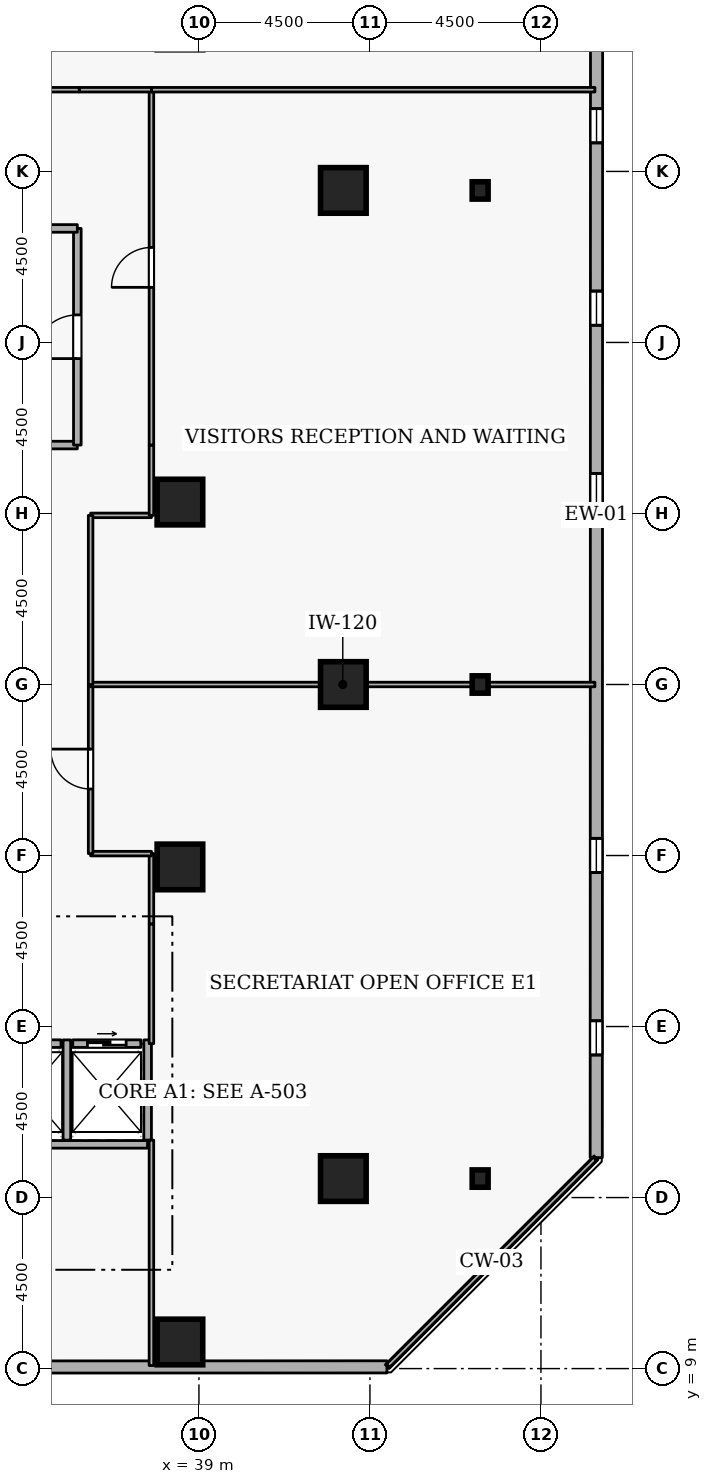
"""IFC4 building model, lengths in metres.
Left out: names, types, materials, properties, quantities, classifications, styles, units other than length and angle.
Written with IfcOpenShell. Run it as: python <this file> out.ifc"""

import sys

from ifc_helpers import new_model, si_unit, direction, frame, frame_2d, origin, origin_2d, place, context, subcontext, project, spatial, rectangle, i_section, extrude, element, fill, save


model = new_model("IFC4")
c1 = context("Model", 3, precision=1e-05, world=origin(), true_north=direction((0.0, 1.0)))
c2 = subcontext(c1, "Body", "Model", "MODEL_VIEW")
j1 = project(units=[si_unit("LENGTHUNIT", "METRE"), si_unit("PLANEANGLEUNIT", "RADIAN")], contexts=[c1])
p1 = place(None, origin())
s1 = spatial("IfcSite", under=j1, at=p1, CompositionType="ELEMENT")
p2 = place(p1, origin())
s2 = spatial("IfcBuilding", under=s1, at=p2, CompositionType="ELEMENT")
p3 = place(p2, frame((0.0, 0.0, 83.7)))
s3 = spatial("IfcBuildingStorey", under=s2, at=p3, CompositionType="ELEMENT", Elevation=83.7)
for number, where, z_axis, x_axis in (
    (1, (38.5, 9.7, 0.0), (0.0, 0.0, 1.0), (1.0, 0.0, 0.0)),
    (2, (42.8, 14.0, 0.0), (0.0, 0.0, 1.0), (1.0, 0.0, 0.0)),
    (3, (42.8, 27.0, 0.0), (0.0, 0.0, 1.0), (1.0, 0.0, 0.0)),
    (4, (42.8, 40.0, 0.0), (0.0, 0.0, 1.0), (1.0, 0.0, 0.0)),
    (5, (38.5, 22.2, 0.0), (0.0, 0.0, 1.0), (1.0, 0.0, 0.0)),
    (6, (38.5, 31.8, 0.0), (0.0, 0.0, 1.0), (1.0, 0.0, 0.0)),
):
    element("IfcColumn", number, at=place(p3, frame(where, z_axis=z_axis, x_axis=x_axis)), inside=s3, PredefinedType="COLUMN", context=c2, shape_type="SweptSolid", body=[
        extrude(rectangle(XDim=1.2, YDim=1.2, at=origin_2d()), origin(), (0.0, 0.0, 1.0), 3.6),
    ])
for number, where, z_axis, x_axis in (
    (7, (46.4, 14.0, 0.0), (0.0, 0.0, 1.0), (1.0, 0.0, 0.0)),
    (8, (46.4, 27.0, 0.0), (0.0, 0.0, 1.0), (1.0, 0.0, 0.0)),
    (9, (46.4, 40.0, 0.0), (0.0, 0.0, 1.0), (1.0, 0.0, 0.0)),
):
    element("IfcColumn", number, at=place(p3, frame(where, z_axis=z_axis, x_axis=x_axis)), inside=s3, PredefinedType="COLUMN", context=c2, shape_type="SweptSolid", body=[
        extrude(i_section(OverallWidth=0.418, OverallDepth=0.456, WebThickness=0.042, FlangeThickness=0.067, FilletRadius=0.015, at=origin_2d()), origin(), (0.0, 0.0, 1.0), 3.6),
    ])
p4 = place(p3, frame((10.119, 9.035, 0.0), z_axis=(0.0, 0.0, 1.0), x_axis=(0.999999960392, 0.000281454314, 0.0)))
e10 = element("IfcWall", 10, at=p4, inside=s3, PredefinedType="STANDARD", context=c2, shape_type="SweptSolid", body=[
    extrude(rectangle(XDim=33.83, YDim=0.32, at=frame_2d((16.915, 0.0))), origin(), (0.0, 0.0, 1.0), 2.7),
])
p5 = place(p4, frame((7.5, 0.0, 0.72)))
e11 = element("IfcOpeningElement", 11, at=p5, cuts=e10, PredefinedType="OPENING", context=c2, shape_type="SweptSolid", body=[
    extrude(rectangle(XDim=0.9, YDim=1.75, at=frame_2d((0.45, 0.875))), frame((0.0, 0.17, 0.0), z_axis=(0.0, -1.0, 0.0), x_axis=(1.0, 0.0, 0.0)), (0.0, 0.0, 1.0), 0.34),
])
p6 = place(p4, frame((12.3, 0.0, 0.72)))
e12 = element("IfcOpeningElement", 12, at=p6, cuts=e10, PredefinedType="OPENING", context=c2, shape_type="SweptSolid", body=[
    extrude(rectangle(XDim=0.9, YDim=1.75, at=frame_2d((0.45, 0.875))), frame((0.0, 0.17, 0.0), z_axis=(0.0, -1.0, 0.0), x_axis=(1.0, 0.0, 0.0)), (0.0, 0.0, 1.0), 0.34),
])
p7 = place(p4, frame((17.1, 0.0, 0.72)))
e13 = element("IfcOpeningElement", 13, at=p7, cuts=e10, PredefinedType="OPENING", context=c2, shape_type="SweptSolid", body=[
    extrude(rectangle(XDim=0.9, YDim=1.75, at=frame_2d((0.45, 0.875))), frame((0.0, 0.17, 0.0), z_axis=(0.0, -1.0, 0.0), x_axis=(1.0, 0.0, 0.0)), (0.0, 0.0, 1.0), 0.34),
])
p8 = place(p4, frame((21.9, 0.0, 0.72)))
e14 = element("IfcOpeningElement", 14, at=p8, cuts=e10, PredefinedType="OPENING", context=c2, shape_type="SweptSolid", body=[
    extrude(rectangle(XDim=0.9, YDim=1.75, at=frame_2d((0.45, 0.875))), frame((0.0, 0.17, 0.0), z_axis=(0.0, -1.0, 0.0), x_axis=(1.0, 0.0, 0.0)), (0.0, 0.0, 1.0), 0.34),
])
p9 = place(p3, frame((49.455, 14.552, 0.0), z_axis=(0.0, 0.0, 1.0), x_axis=(0.000281454314, 0.999999960392, 0.0)))
e15 = element("IfcWall", 15, at=p9, inside=s3, PredefinedType="STANDARD", context=c2, shape_type="SweptSolid", body=[
    extrude(rectangle(XDim=33.83, YDim=0.32, at=frame_2d((16.915, 0.0))), origin(), (0.0, 0.0, 1.0), 2.7),
])
p10 = place(p9, frame((2.7, 0.0, 0.72)))
e16 = element("IfcOpeningElement", 16, at=p10, cuts=e15, PredefinedType="OPENING", context=c2, shape_type="SweptSolid", body=[
    extrude(rectangle(XDim=0.9, YDim=1.75, at=frame_2d((0.45, 0.875))), frame((0.0, 0.17, 0.0), z_axis=(0.0, -1.0, 0.0), x_axis=(1.0, 0.0, 0.0)), (0.0, 0.0, 1.0), 0.34),
])
p11 = place(p9, frame((7.5, 0.0, 0.72)))
e17 = element("IfcOpeningElement", 17, at=p11, cuts=e15, PredefinedType="OPENING", context=c2, shape_type="SweptSolid", body=[
    extrude(rectangle(XDim=0.9, YDim=1.75, at=frame_2d((0.45, 0.875))), frame((0.0, 0.17, 0.0), z_axis=(0.0, -1.0, 0.0), x_axis=(1.0, 0.0, 0.0)), (0.0, 0.0, 1.0), 0.34),
])
p12 = place(p9, frame((17.1, 0.0, 0.72)))
e18 = element("IfcOpeningElement", 18, at=p12, cuts=e15, PredefinedType="OPENING", context=c2, shape_type="SweptSolid", body=[
    extrude(rectangle(XDim=0.9, YDim=1.75, at=frame_2d((0.45, 0.875))), frame((0.0, 0.17, 0.0), z_axis=(0.0, -1.0, 0.0), x_axis=(1.0, 0.0, 0.0)), (0.0, 0.0, 1.0), 0.34),
])
p13 = place(p9, frame((21.9, 0.0, 0.72)))
e19 = element("IfcOpeningElement", 19, at=p13, cuts=e15, PredefinedType="OPENING", context=c2, shape_type="SweptSolid", body=[
    extrude(rectangle(XDim=0.9, YDim=1.75, at=frame_2d((0.45, 0.875))), frame((0.0, 0.17, 0.0), z_axis=(0.0, -1.0, 0.0), x_axis=(1.0, 0.0, 0.0)), (0.0, 0.0, 1.0), 0.34),
])
p14 = place(p9, frame((26.7, 0.0, 0.72)))
e20 = element("IfcOpeningElement", 20, at=p14, cuts=e15, PredefinedType="OPENING", context=c2, shape_type="SweptSolid", body=[
    extrude(rectangle(XDim=0.9, YDim=1.75, at=frame_2d((0.45, 0.875))), frame((0.0, 0.17, 0.0), z_axis=(0.0, -1.0, 0.0), x_axis=(1.0, 0.0, 0.0)), (0.0, 0.0, 1.0), 0.34),
])
p15 = place(p3, frame((33.63, 17.55, 0.0), z_axis=(0.0, 0.0, 1.0), x_axis=(1.0, 0.0, 0.0)))
e21 = element("IfcWall", 21, at=p15, inside=s3, PredefinedType="STANDARD", context=c2, shape_type="SweptSolid", body=[
    extrude(rectangle(XDim=1.74, YDim=0.2, at=frame_2d((0.87, 0.0))), origin(), (0.0, 0.0, 1.0), 3.34),
])
p16 = place(p15, frame((0.36, 0.0, 0.0)))
e22 = element("IfcOpeningElement", 22, at=p16, cuts=e21, PredefinedType="OPENING", context=c2, shape_type="SweptSolid", body=[
    extrude(rectangle(XDim=1.02, YDim=2.06, at=frame_2d((0.51, 1.03))), frame((0.0, 0.11, 0.0), z_axis=(0.0, -1.0, 0.0), x_axis=(1.0, 0.0, 0.0)), (0.0, 0.0, 1.0), 0.22),
])
p17 = place(p3, frame((35.68, 17.55, 0.0), z_axis=(0.0, 0.0, 1.0), x_axis=(1.0, 0.0, 0.0)))
e23 = element("IfcWall", 23, at=p17, inside=s3, PredefinedType="STANDARD", context=c2, shape_type="SweptSolid", body=[
    extrude(rectangle(XDim=1.79, YDim=0.2, at=frame_2d((0.895, 0.0))), origin(), (0.0, 0.0, 1.0), 3.34),
])
p18 = place(p17, frame((0.385, 0.0, 0.0)))
e24 = element("IfcOpeningElement", 24, at=p18, cuts=e23, PredefinedType="OPENING", context=c2, shape_type="SweptSolid", body=[
    extrude(rectangle(XDim=1.02, YDim=2.06, at=frame_2d((0.51, 1.03))), frame((0.0, 0.11, 0.0), z_axis=(0.0, -1.0, 0.0), x_axis=(1.0, 0.0, 0.0)), (0.0, 0.0, 1.0), 0.22),
])
p19 = place(p3, frame((33.452, 14.9, 0.0), z_axis=(0.0, 0.0, 1.0), x_axis=(1.0, 0.0, 0.0)))
e25 = element("IfcWall", 25, at=p19, inside=s3, PredefinedType="STANDARD", context=c2, shape_type="SweptSolid", body=[
    extrude(rectangle(XDim=4.196, YDim=0.2, at=frame_2d((2.098, 0.0))), origin(), (0.0, 0.0, 1.0), 3.34),
])
for number, where, z_axis, x_axis in (
    (26, (35.525, 15.012, 0.0), (0.0, 0.0, 1.0), (0.0, 1.0, 0.0)),
    (27, (37.65, 15.012, 0.0), (0.0, 0.0, 1.0), (0.0, 1.0, 0.0)),
):
    element("IfcWall", number, at=place(p3, frame(where, z_axis=z_axis, x_axis=x_axis)), inside=s3, PredefinedType="STANDARD", context=c2, shape_type="SweptSolid", body=[
        extrude(rectangle(XDim=2.636, YDim=0.2, at=frame_2d((1.318, 0.0))), origin(), (0.0, 0.0, 1.0), 3.34),
    ])
p20 = place(p3, frame((33.3, 33.3, 0.0), z_axis=(0.0, 0.0, 1.0), x_axis=(1.0, 0.0, 0.0)))
e28 = element("IfcWall", 28, at=p20, inside=s3, PredefinedType="STANDARD", context=c2, shape_type="SweptSolid", body=[
    extrude(rectangle(XDim=2.5, YDim=0.2, at=frame_2d((1.25, 0.0))), origin(), (0.0, 0.0, 1.0), 3.34),
])
p21 = place(p3, frame((35.8, 33.3, 0.0), z_axis=(0.0, 0.0, 1.0), x_axis=(0.0, 1.0, 0.0)))
e29 = element("IfcWall", 29, at=p21, inside=s3, PredefinedType="STANDARD", context=c2, shape_type="SweptSolid", body=[
    extrude(rectangle(XDim=5.7, YDim=0.2, at=frame_2d((2.85, 0.0))), origin(), (0.0, 0.0, 1.0), 3.34),
])
p22 = place(p21, frame((2.275, 0.0, 0.0)))
e30 = element("IfcOpeningElement", 30, at=p22, cuts=e29, PredefinedType="OPENING", context=c2, shape_type="SweptSolid", body=[
    extrude(rectangle(XDim=1.15, YDim=2.1, at=frame_2d((0.575, 1.05))), frame((0.0, 0.11, 0.0), z_axis=(0.0, -1.0, 0.0), x_axis=(1.0, 0.0, 0.0)), (0.0, 0.0, 1.0), 0.22),
])
p23 = place(p3, frame((35.8, 39.0, 0.0), z_axis=(0.0, 0.0, 1.0), x_axis=(-1.0, 0.0, 0.0)))
e31 = element("IfcWall", 31, at=p23, inside=s3, PredefinedType="STANDARD", context=c2, shape_type="SweptSolid", body=[
    extrude(rectangle(XDim=2.5, YDim=0.2, at=frame_2d((1.25, 0.0))), origin(), (0.0, 0.0, 1.0), 3.34),
])
p24 = place(p3, frame((37.75, 17.55, 0.0), z_axis=(0.0, 0.0, 1.0), x_axis=(0.0, 1.0, 0.0)))
e32 = element("IfcWall", 32, at=p24, inside=s3, PredefinedType="PARTITIONING", context=c2, shape_type="SweptSolid", body=[
    extrude(rectangle(XDim=3.15, YDim=0.12, at=frame_2d((1.575, 0.0))), origin(), (0.0, 0.0, 1.0), 3.34),
])
p25 = place(p3, frame((37.75, 20.7, 0.0), z_axis=(0.0, 0.0, 1.0), x_axis=(0.0, 1.0, 0.0)))
e33 = element("IfcWall", 33, at=p25, inside=s3, PredefinedType="PARTITIONING", context=c2, shape_type="SweptSolid", body=[
    extrude(rectangle(XDim=1.85, YDim=0.12, at=frame_2d((0.925, 0.0))), origin(), (0.0, 0.0, 1.0), 3.34),
])
p26 = place(p3, frame((37.75, 22.55, 0.0), z_axis=(0.0, 0.0, 1.0), x_axis=(-1.0, 0.0, 0.0)))
e34 = element("IfcWall", 34, at=p26, inside=s3, PredefinedType="PARTITIONING", context=c2, shape_type="SweptSolid", body=[
    extrude(rectangle(XDim=1.6, YDim=0.12, at=frame_2d((0.8, 0.0))), origin(), (0.0, 0.0, 1.0), 3.34),
])
p27 = place(p3, frame((36.15, 22.55, 0.0), z_axis=(0.0, 0.0, 1.0), x_axis=(0.0, 1.0, 0.0)))
e35 = element("IfcWall", 35, at=p27, inside=s3, PredefinedType="PARTITIONING", context=c2, shape_type="SweptSolid", body=[
    extrude(rectangle(XDim=4.45, YDim=0.12, at=frame_2d((2.225, 0.0))), origin(), (0.0, 0.0, 1.0), 3.34),
])
p28 = place(p27, frame((1.7, 0.0, 0.0)))
e36 = element("IfcOpeningElement", 36, at=p28, cuts=e35, PredefinedType="OPENING", context=c2, shape_type="SweptSolid", body=[
    extrude(rectangle(XDim=1.05, YDim=2.1, at=frame_2d((0.525, 1.05))), frame((0.0, 0.07, 0.0), z_axis=(0.0, -1.0, 0.0), x_axis=(1.0, 0.0, 0.0)), (0.0, 0.0, 1.0), 0.14),
])
p29 = place(p3, frame((36.15, 27.0, 0.0), z_axis=(0.0, 0.0, 1.0), x_axis=(1.0, 0.0, 0.0)))
e37 = element("IfcWall", 37, at=p29, inside=s3, PredefinedType="PARTITIONING", context=c2, shape_type="SweptSolid", body=[
    extrude(rectangle(XDim=13.27, YDim=0.12, at=frame_2d((6.635, 0.0))), origin(), (0.0, 0.0, 1.0), 2.882),
])
p30 = place(p3, frame((49.42, 14.52, 0.0), z_axis=(0.0, 0.0, 1.0), x_axis=(-0.707106781187, -0.707106781187, 0.0)))
e38 = element("IfcWall", 38, at=p30, inside=s3, PredefinedType="PARTITIONING", context=c2, shape_type="SweptSolid", body=[
    extrude(rectangle(XDim=7.693, YDim=0.12, at=frame_2d((3.846, 0.0))), origin(), (0.0, 0.0, 1.0), 3.34),
])
p31 = place(p3, frame((37.75, 9.08, 0.0), z_axis=(0.0, 0.0, 1.0), x_axis=(0.0, 1.0, 0.0)))
e39 = element("IfcWall", 39, at=p31, inside=s3, PredefinedType="PARTITIONING", context=c2, shape_type="SweptSolid", body=[
    extrude(rectangle(XDim=5.932, YDim=0.12, at=frame_2d((2.966, 0.0))), origin(), (0.0, 0.0, 1.0), 3.34),
])
p32 = place(p3, frame((36.15, 31.45, 0.0), z_axis=(0.0, 0.0, 1.0), x_axis=(1.0, 0.0, 0.0)))
e40 = element("IfcWall", 40, at=p32, inside=s3, PredefinedType="PARTITIONING", context=c2, shape_type="SweptSolid", body=[
    extrude(rectangle(XDim=1.6, YDim=0.12, at=frame_2d((0.8, 0.0))), origin(), (0.0, 0.0, 1.0), 3.34),
])
p33 = place(p3, frame((37.75, 31.45, 0.0), z_axis=(0.0, 0.0, 1.0), x_axis=(0.0, 1.0, 0.0)))
e41 = element("IfcWall", 41, at=p33, inside=s3, PredefinedType="PARTITIONING", context=c2, shape_type="SweptSolid", body=[
    extrude(rectangle(XDim=1.85, YDim=0.12, at=frame_2d((0.925, 0.0))), origin(), (0.0, 0.0, 1.0), 3.34),
])
p34 = place(p3, frame((37.75, 33.3, 0.0), z_axis=(0.0, 0.0, 1.0), x_axis=(0.0, 1.0, 0.0)))
e42 = element("IfcWall", 42, at=p34, inside=s3, PredefinedType="PARTITIONING", context=c2, shape_type="SweptSolid", body=[
    extrude(rectangle(XDim=9.35, YDim=0.12, at=frame_2d((4.675, 0.0))), origin(), (0.0, 0.0, 1.0), 3.34),
])
p35 = place(p34, frame((4.15, 0.0, 0.0)))
e43 = element("IfcOpeningElement", 43, at=p35, cuts=e42, PredefinedType="OPENING", context=c2, shape_type="SweptSolid", body=[
    extrude(rectangle(XDim=1.05, YDim=2.1, at=frame_2d((0.525, 1.05))), frame((0.0, 0.07, 0.0), z_axis=(0.0, -1.0, 0.0), x_axis=(1.0, 0.0, 0.0)), (0.0, 0.0, 1.0), 0.14),
])
p36 = place(p3, frame((37.75, 42.65, 0.0), z_axis=(0.0, 0.0, 1.0), x_axis=(1.0, 0.0, 0.0)))
e44 = element("IfcWall", 44, at=p36, inside=s3, PredefinedType="PARTITIONING", context=c2, shape_type="SweptSolid", body=[
    extrude(rectangle(XDim=11.67, YDim=0.12, at=frame_2d((5.835, 0.0))), origin(), (0.0, 0.0, 1.0), 3.34),
])
p37 = place(p3, frame((36.15, 27.0, 0.0), z_axis=(0.0, 0.0, 1.0), x_axis=(0.0, 1.0, 0.0)))
e45 = element("IfcWall", 45, at=p37, inside=s3, PredefinedType="PARTITIONING", context=c2, shape_type="SweptSolid", body=[
    extrude(rectangle(XDim=4.45, YDim=0.12, at=frame_2d((2.225, 0.0))), origin(), (0.0, 0.0, 1.0), 3.34),
])
p38 = place(p3, frame((37.75, 42.65, 0.0), z_axis=(0.0, 0.0, 1.0), x_axis=(-1.0, 0.0, 0.0)))
e46 = element("IfcWall", 46, at=p38, inside=s3, PredefinedType="PARTITIONING", context=c2, shape_type="SweptSolid", body=[
    extrude(rectangle(XDim=1.9, YDim=0.12, at=frame_2d((0.95, 0.0))), origin(), (0.0, 0.0, 1.0), 2.895),
])
p39 = place(p3, frame((35.85, 42.65, 0.0), z_axis=(0.0, 0.0, 1.0), x_axis=(-1.0, 0.0, 0.0)))
e47 = element("IfcWall", 47, at=p39, inside=s3, PredefinedType="PARTITIONING", context=c2, shape_type="SweptSolid", body=[
    extrude(rectangle(XDim=10.35, YDim=0.12, at=frame_2d((5.175, 0.0))), origin(), (0.0, 0.0, 1.0), 2.895),
])
p40 = place(p39, frame((4.65, 0.0, 0.0)))
e48 = element("IfcOpeningElement", 48, at=p40, cuts=e47, PredefinedType="OPENING", context=c2, shape_type="SweptSolid", body=[
    extrude(rectangle(XDim=1.05, YDim=2.1, at=frame_2d((0.525, 1.05))), frame((0.0, 0.07, 0.0), z_axis=(0.0, -1.0, 0.0), x_axis=(1.0, 0.0, 0.0)), (0.0, 0.0, 1.0), 0.14),
])
p41 = place(p10, origin())
e49 = element("IfcWindow", 49, at=p41, inside=s3, PartitioningType="SINGLE_PANEL", PredefinedType="WINDOW", context=c2, shape_type="SweptSolid", body=[
    extrude(rectangle(XDim=0.9, YDim=1.75, at=frame_2d((0.45, 0.875))), frame((0.0, 0.03, 0.0), z_axis=(0.0, -1.0, 0.0), x_axis=(1.0, 0.0, 0.0)), (0.0, 0.0, 1.0), 0.06),
])
fill(e16, e49)
p42 = place(p11, origin())
e50 = element("IfcWindow", 50, at=p42, inside=s3, PartitioningType="SINGLE_PANEL", PredefinedType="WINDOW", context=c2, shape_type="SweptSolid", body=[
    extrude(rectangle(XDim=0.9, YDim=1.75, at=frame_2d((0.45, 0.875))), frame((0.0, 0.03, 0.0), z_axis=(0.0, -1.0, 0.0), x_axis=(1.0, 0.0, 0.0)), (0.0, 0.0, 1.0), 0.06),
])
fill(e17, e50)
p43 = place(p12, origin())
e51 = element("IfcWindow", 51, at=p43, inside=s3, PartitioningType="SINGLE_PANEL", PredefinedType="WINDOW", context=c2, shape_type="SweptSolid", body=[
    extrude(rectangle(XDim=0.9, YDim=1.75, at=frame_2d((0.45, 0.875))), frame((0.0, 0.03, 0.0), z_axis=(0.0, -1.0, 0.0), x_axis=(1.0, 0.0, 0.0)), (0.0, 0.0, 1.0), 0.06),
])
fill(e18, e51)
p44 = place(p13, origin())
e52 = element("IfcWindow", 52, at=p44, inside=s3, PartitioningType="SINGLE_PANEL", PredefinedType="WINDOW", context=c2, shape_type="SweptSolid", body=[
    extrude(rectangle(XDim=0.9, YDim=1.75, at=frame_2d((0.45, 0.875))), frame((0.0, 0.03, 0.0), z_axis=(0.0, -1.0, 0.0), x_axis=(1.0, 0.0, 0.0)), (0.0, 0.0, 1.0), 0.06),
])
fill(e19, e52)
p45 = place(p14, origin())
e53 = element("IfcWindow", 53, at=p45, inside=s3, PartitioningType="SINGLE_PANEL", PredefinedType="WINDOW", context=c2, shape_type="SweptSolid", body=[
    extrude(rectangle(XDim=0.9, YDim=1.75, at=frame_2d((0.45, 0.875))), frame((0.0, 0.03, 0.0), z_axis=(0.0, -1.0, 0.0), x_axis=(1.0, 0.0, 0.0)), (0.0, 0.0, 1.0), 0.06),
])
fill(e20, e53)
p46 = place(p18, origin())
e54 = element("IfcDoor", 54, at=p46, inside=s3, OperationType="SLIDING_TO_LEFT", PredefinedType="DOOR", context=c2, shape_type="SweptSolid", body=[
    extrude(rectangle(XDim=1.02, YDim=2.06, at=frame_2d((0.51, 1.03))), frame((0.0, 0.025, 0.0), z_axis=(0.0, -1.0, 0.0), x_axis=(1.0, 0.0, 0.0)), (0.0, 0.0, 1.0), 0.05),
])
fill(e24, e54)
p47 = place(p22, origin())
e55 = element("IfcDoor", 55, at=p47, inside=s3, OperationType="SINGLE_SWING_LEFT", PredefinedType="DOOR", context=c2, shape_type="SweptSolid", body=[
    extrude(rectangle(XDim=1.15, YDim=2.1, at=frame_2d((0.575, 1.05))), frame((0.0, 0.025, 0.0), z_axis=(0.0, -1.0, 0.0), x_axis=(1.0, 0.0, 0.0)), (0.0, 0.0, 1.0), 0.05),
])
fill(e30, e55)
p48 = place(p28, origin())
e56 = element("IfcDoor", 56, at=p48, inside=s3, OperationType="SINGLE_SWING_RIGHT", PredefinedType="DOOR", context=c2, shape_type="SweptSolid", body=[
    extrude(rectangle(XDim=1.05, YDim=2.1, at=frame_2d((0.525, 1.05))), frame((0.0, 0.025, 0.0), z_axis=(0.0, -1.0, 0.0), x_axis=(1.0, 0.0, 0.0)), (0.0, 0.0, 1.0), 0.05),
])
fill(e36, e56)
p49 = place(p35, origin())
e57 = element("IfcDoor", 57, at=p49, inside=s3, OperationType="SINGLE_SWING_LEFT", PredefinedType="DOOR", context=c2, shape_type="SweptSolid", body=[
    extrude(rectangle(XDim=1.05, YDim=2.1, at=frame_2d((0.525, 1.05))), frame((0.0, 0.025, 0.0), z_axis=(0.0, -1.0, 0.0), x_axis=(1.0, 0.0, 0.0)), (0.0, 0.0, 1.0), 0.05),
])
fill(e43, e57)
save(model, sys.argv[1])
